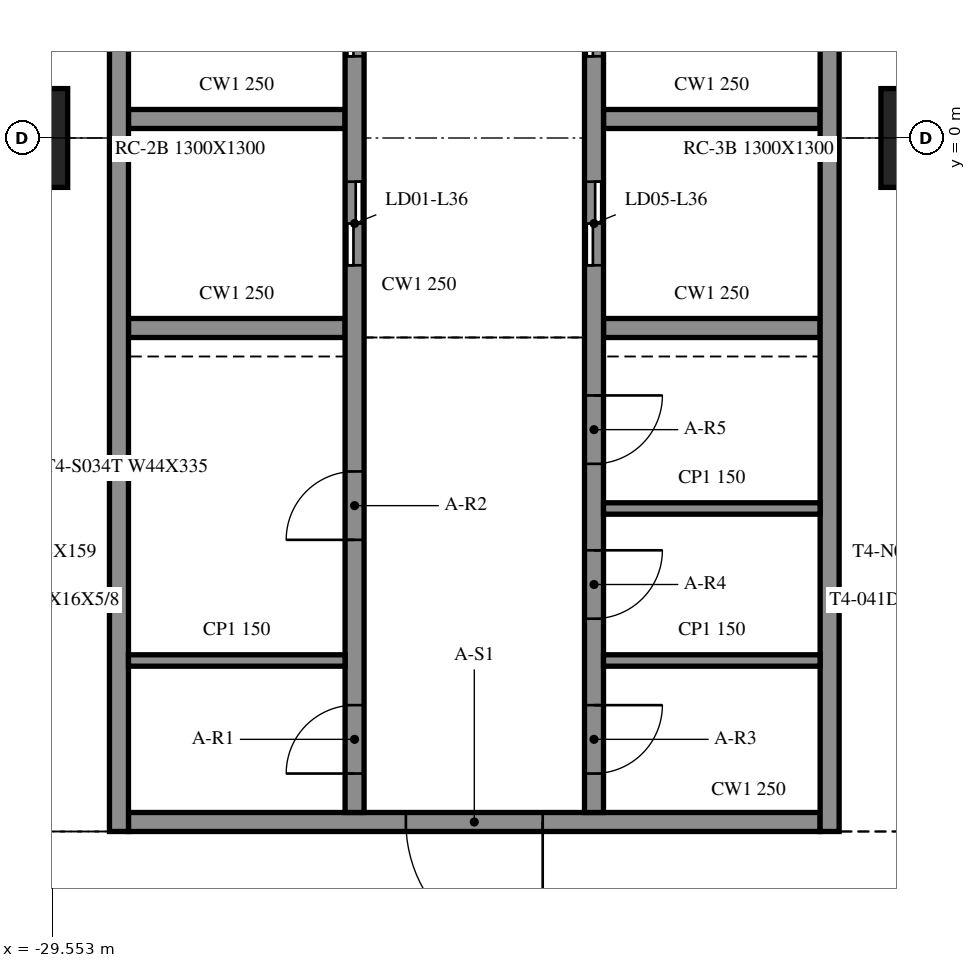
"""IFC4 building model, lengths in metres.
Left out: names, types, materials, properties, quantities, classifications, styles, units other than length and angle.
Written with IfcOpenShell. Run it as: python <this file> out.ifc"""

import sys

from ifc_helpers import new_model, si_unit, direction, frame, frame_2d, origin, origin_2d, place, context, subcontext, project, spatial, rectangle, extrude, element, fill, save


model = new_model("IFC4")
c1 = context("Model", 3, precision=1e-05, world=origin(), true_north=direction((0.0, 1.0)))
c2 = subcontext(c1, "Body", "Model", "MODEL_VIEW")
j1 = project(units=[si_unit("LENGTHUNIT", "METRE"), si_unit("PLANEANGLEUNIT", "RADIAN")], contexts=[c1])
p1 = place(None, origin())
s1 = spatial("IfcSite", under=j1, at=p1, CompositionType="ELEMENT")
p2 = place(p1, origin())
s2 = spatial("IfcBuilding", under=s1, at=p2, CompositionType="ELEMENT")
p3 = place(p2, frame((0.0, 0.0, 154.8)))
s3 = spatial("IfcBuildingStorey", under=s2, at=p3, CompositionType="ELEMENT", Elevation=154.8)
for number, where, z_axis, x_axis in (
    (1, (-30.0, 0.0, -0.55), (0.0, 0.0, 1.0), (1.0, 0.0, 0.0)),
    (2, (-18.0, 0.0, -0.55), (0.0, 0.0, 1.0), (1.0, 0.0, 0.0)),
):
    element("IfcColumn", number, at=place(p3, frame(where, z_axis=z_axis, x_axis=x_axis)), inside=s3, PredefinedType="COLUMN", context=c2, shape_type="SweptSolid", body=[
        extrude(rectangle(XDim=1.3, YDim=1.3, at=origin_2d()), origin(), (0.0, 0.0, 1.0), 4.61),
    ])
for number, where, z_axis, x_axis in (
    (3, (-28.675, 15.125, 0.0), (0.0, 0.0, 1.0), (0.0, -1.0, 0.0)),
    (4, (-19.325, -9.125, 0.0), (0.0, 0.0, 1.0), (0.0, 1.0, 0.0)),
):
    element("IfcWall", number, at=place(p3, frame(where, z_axis=z_axis, x_axis=x_axis)), inside=s3, PredefinedType="SOLIDWALL", context=c2, shape_type="SweptSolid", body=[
        extrude(rectangle(XDim=24.25, YDim=0.25, at=frame_2d((12.125, 0.0))), origin(), (0.0, 0.0, 1.0), 4.06),
    ])
p4 = place(p3, frame((-19.45, -9.0, 0.0), z_axis=(0.0, 0.0, 1.0), x_axis=(-1.0, 0.0, 0.0)))
e5 = element("IfcWall", 5, at=p4, inside=s3, PredefinedType="SOLIDWALL", context=c2, shape_type="SweptSolid", body=[
    extrude(rectangle(XDim=9.1, YDim=0.25, at=frame_2d((4.55, 0.0))), origin(), (0.0, 0.0, 1.0), 4.06),
])
p5 = place(p4, frame((3.65, 0.0, 0.0)))
e6 = element("IfcOpeningElement", 6, at=p5, cuts=e5, PredefinedType="OPENING", context=c2, shape_type="SweptSolid", body=[
    extrude(rectangle(XDim=1.8, YDim=2.1, at=frame_2d((0.9, 1.05))), frame((0.0, 0.135, 0.0), z_axis=(0.0, -1.0, 0.0), x_axis=(1.0, 0.0, 0.0)), (0.0, 0.0, 1.0), 0.27),
])
p6 = place(p3, frame((-25.575, -8.875, 0.0), z_axis=(0.0, 0.0, 1.0), x_axis=(0.0, 1.0, 0.0)))
e7 = element("IfcWall", 7, at=p6, inside=s3, PredefinedType="SOLIDWALL", context=c2, shape_type="SweptSolid", body=[
    extrude(rectangle(XDim=17.5, YDim=0.25, at=frame_2d((8.75, 0.0))), origin(), (0.0, 0.0, 1.0), 4.06),
])
p7 = place(p6, frame((7.2, 0.0, 0.0)))
e8 = element("IfcOpeningElement", 8, at=p7, cuts=e7, PredefinedType="OPENING", context=c2, shape_type="SweptSolid", body=[
    extrude(rectangle(XDim=1.1, YDim=2.1, at=frame_2d((0.55, 1.05))), frame((0.0, 0.135, 0.0), z_axis=(0.0, -1.0, 0.0), x_axis=(1.0, 0.0, 0.0)), (0.0, 0.0, 1.0), 0.27),
])
p8 = place(p6, frame((9.95, 0.0, 0.0)))
e9 = element("IfcOpeningElement", 9, at=p8, cuts=e7, PredefinedType="OPENING", context=c2, shape_type="SweptSolid", body=[
    extrude(rectangle(XDim=1.1, YDim=2.1, at=frame_2d((0.55, 1.05))), frame((0.0, 0.135, 0.0), z_axis=(0.0, -1.0, 0.0), x_axis=(1.0, 0.0, 0.0)), (0.0, 0.0, 1.0), 0.27),
])
p9 = place(p6, frame((12.7, 0.0, 0.0)))
e10 = element("IfcOpeningElement", 10, at=p9, cuts=e7, PredefinedType="OPENING", context=c2, shape_type="SweptSolid", body=[
    extrude(rectangle(XDim=1.1, YDim=2.1, at=frame_2d((0.55, 1.05))), frame((0.0, 0.135, 0.0), z_axis=(0.0, -1.0, 0.0), x_axis=(1.0, 0.0, 0.0)), (0.0, 0.0, 1.0), 0.27),
])
p10 = place(p6, frame((15.45, 0.0, 0.0)))
e11 = element("IfcOpeningElement", 11, at=p10, cuts=e7, PredefinedType="OPENING", context=c2, shape_type="SweptSolid", body=[
    extrude(rectangle(XDim=1.1, YDim=2.1, at=frame_2d((0.55, 1.05))), frame((0.0, 0.135, 0.0), z_axis=(0.0, -1.0, 0.0), x_axis=(1.0, 0.0, 0.0)), (0.0, 0.0, 1.0), 0.27),
])
p11 = place(p6, frame((0.512, 0.0, 0.0)))
e12 = element("IfcOpeningElement", 12, at=p11, cuts=e7, PredefinedType="OPENING", context=c2, shape_type="SweptSolid", body=[
    extrude(rectangle(XDim=0.9, YDim=2.1, at=frame_2d((0.45, 1.05))), frame((0.0, 0.135, 0.0), z_axis=(0.0, -1.0, 0.0), x_axis=(1.0, 0.0, 0.0)), (0.0, 0.0, 1.0), 0.27),
])
p12 = place(p6, frame((3.587, 0.0, 0.0)))
e13 = element("IfcOpeningElement", 13, at=p12, cuts=e7, PredefinedType="OPENING", context=c2, shape_type="SweptSolid", body=[
    extrude(rectangle(XDim=0.9, YDim=2.1, at=frame_2d((0.45, 1.05))), frame((0.0, 0.135, 0.0), z_axis=(0.0, -1.0, 0.0), x_axis=(1.0, 0.0, 0.0)), (0.0, 0.0, 1.0), 0.27),
])
p13 = place(p3, frame((-22.425, 14.875, 0.0), z_axis=(0.0, 0.0, 1.0), x_axis=(0.0, -1.0, 0.0)))
e14 = element("IfcWall", 14, at=p13, inside=s3, PredefinedType="SOLIDWALL", context=c2, shape_type="SweptSolid", body=[
    extrude(rectangle(XDim=23.75, YDim=0.25, at=frame_2d((11.875, 0.0))), origin(), (0.0, 0.0, 1.0), 4.06),
])
p14 = place(p13, frame((15.45, 0.0, 0.0)))
e15 = element("IfcOpeningElement", 15, at=p14, cuts=e14, PredefinedType="OPENING", context=c2, shape_type="SweptSolid", body=[
    extrude(rectangle(XDim=1.1, YDim=2.1, at=frame_2d((0.55, 1.05))), frame((0.0, 0.135, 0.0), z_axis=(0.0, -1.0, 0.0), x_axis=(1.0, 0.0, 0.0)), (0.0, 0.0, 1.0), 0.27),
])
p15 = place(p13, frame((12.7, 0.0, 0.0)))
e16 = element("IfcOpeningElement", 16, at=p15, cuts=e14, PredefinedType="OPENING", context=c2, shape_type="SweptSolid", body=[
    extrude(rectangle(XDim=1.1, YDim=2.1, at=frame_2d((0.55, 1.05))), frame((0.0, 0.135, 0.0), z_axis=(0.0, -1.0, 0.0), x_axis=(1.0, 0.0, 0.0)), (0.0, 0.0, 1.0), 0.27),
])
p16 = place(p13, frame((9.95, 0.0, 0.0)))
e17 = element("IfcOpeningElement", 17, at=p16, cuts=e14, PredefinedType="OPENING", context=c2, shape_type="SweptSolid", body=[
    extrude(rectangle(XDim=1.1, YDim=2.1, at=frame_2d((0.55, 1.05))), frame((0.0, 0.135, 0.0), z_axis=(0.0, -1.0, 0.0), x_axis=(1.0, 0.0, 0.0)), (0.0, 0.0, 1.0), 0.27),
])
p17 = place(p13, frame((7.2, 0.0, 0.0)))
e18 = element("IfcOpeningElement", 18, at=p17, cuts=e14, PredefinedType="OPENING", context=c2, shape_type="SweptSolid", body=[
    extrude(rectangle(XDim=1.1, YDim=2.1, at=frame_2d((0.55, 1.05))), frame((0.0, 0.135, 0.0), z_axis=(0.0, -1.0, 0.0), x_axis=(1.0, 0.0, 0.0)), (0.0, 0.0, 1.0), 0.27),
])
p18 = place(p13, frame((22.337, 0.0, 0.0)))
e19 = element("IfcOpeningElement", 19, at=p18, cuts=e14, PredefinedType="OPENING", context=c2, shape_type="SweptSolid", body=[
    extrude(rectangle(XDim=0.9, YDim=2.1, at=frame_2d((0.45, 1.05))), frame((0.0, 0.135, 0.0), z_axis=(0.0, -1.0, 0.0), x_axis=(1.0, 0.0, 0.0)), (0.0, 0.0, 1.0), 0.27),
])
p19 = place(p13, frame((20.3, 0.0, 0.0)))
e20 = element("IfcOpeningElement", 20, at=p19, cuts=e14, PredefinedType="OPENING", context=c2, shape_type="SweptSolid", body=[
    extrude(rectangle(XDim=0.9, YDim=2.1, at=frame_2d((0.45, 1.05))), frame((0.0, 0.135, 0.0), z_axis=(0.0, -1.0, 0.0), x_axis=(1.0, 0.0, 0.0)), (0.0, 0.0, 1.0), 0.27),
])
p20 = place(p13, frame((18.262, 0.0, 0.0)))
e21 = element("IfcOpeningElement", 21, at=p20, cuts=e14, PredefinedType="OPENING", context=c2, shape_type="SweptSolid", body=[
    extrude(rectangle(XDim=0.9, YDim=2.1, at=frame_2d((0.45, 1.05))), frame((0.0, 0.135, 0.0), z_axis=(0.0, -1.0, 0.0), x_axis=(1.0, 0.0, 0.0)), (0.0, 0.0, 1.0), 0.27),
])
p21 = place(p13, frame((3.587, 0.0, 0.0)))
e22 = element("IfcOpeningElement", 22, at=p21, cuts=e14, PredefinedType="OPENING", context=c2, shape_type="SweptSolid", body=[
    extrude(rectangle(XDim=0.9, YDim=2.1, at=frame_2d((0.45, 1.05))), frame((0.0, 0.135, 0.0), z_axis=(0.0, -1.0, 0.0), x_axis=(1.0, 0.0, 0.0)), (0.0, 0.0, 1.0), 0.27),
])
p22 = place(p13, frame((0.512, 0.0, 0.0)))
e23 = element("IfcOpeningElement", 23, at=p22, cuts=e14, PredefinedType="OPENING", context=c2, shape_type="SweptSolid", body=[
    extrude(rectangle(XDim=0.9, YDim=2.1, at=frame_2d((0.45, 1.05))), frame((0.0, 0.135, 0.0), z_axis=(0.0, -1.0, 0.0), x_axis=(1.0, 0.0, 0.0)), (0.0, 0.0, 1.0), 0.27),
])
for number, where, z_axis, x_axis in (
    (24, (-28.55, -2.5, 0.0), (0.0, 0.0, 1.0), (1.0, 0.0, 0.0)),
    (25, (-28.55, 0.25, 0.0), (0.0, 0.0, 1.0), (1.0, 0.0, 0.0)),
    (26, (-22.3, -2.5, 0.0), (0.0, 0.0, 1.0), (1.0, 0.0, 0.0)),
    (27, (-22.3, 0.25, 0.0), (0.0, 0.0, 1.0), (1.0, 0.0, 0.0)),
):
    element("IfcWall", number, at=place(p3, frame(where, z_axis=z_axis, x_axis=x_axis)), inside=s3, PredefinedType="SOLIDWALL", context=c2, shape_type="SweptSolid", body=[
        extrude(rectangle(XDim=2.85, YDim=0.25, at=frame_2d((1.425, 0.0))), origin(), (0.0, 0.0, 1.0), 4.06),
    ])
for number, where, z_axis, x_axis in (
    (28, (-28.55, -6.875, 0.0), (0.0, 0.0, 1.0), (1.0, 0.0, 0.0)),
    (29, (-22.3, -6.875, 0.0), (0.0, 0.0, 1.0), (1.0, 0.0, 0.0)),
    (30, (-22.3, -4.875, 0.0), (0.0, 0.0, 1.0), (1.0, 0.0, 0.0)),
):
    element("IfcWall", number, at=place(p3, frame(where, z_axis=z_axis, x_axis=x_axis)), inside=s3, PredefinedType="PARTITIONING", context=c2, shape_type="SweptSolid", body=[
        extrude(rectangle(XDim=2.85, YDim=0.15, at=frame_2d((1.425, 0.0))), origin(), (0.0, 0.0, 1.0), 4.06),
    ])
p23 = place(p5, origin())
e31 = element("IfcDoor", 31, at=p23, inside=s3, OperationType="DOUBLE_DOOR_SINGLE_SWING", PredefinedType="DOOR", context=c2, shape_type="SweptSolid", body=[
    extrude(rectangle(XDim=1.8, YDim=2.1, at=frame_2d((0.9, 1.05))), frame((0.0, 0.025, 0.0), z_axis=(0.0, -1.0, 0.0), x_axis=(1.0, 0.0, 0.0)), (0.0, 0.0, 1.0), 0.05),
])
fill(e6, e31)
p24 = place(p14, origin())
e32 = element("IfcDoor", 32, at=p24, inside=s3, OperationType="DOUBLE_DOOR_SLIDING", PredefinedType="DOOR", context=c2, shape_type="SweptSolid", body=[
    extrude(rectangle(XDim=1.1, YDim=2.1, at=frame_2d((0.55, 1.05))), frame((0.0, 0.025, 0.0), z_axis=(0.0, -1.0, 0.0), x_axis=(1.0, 0.0, 0.0)), (0.0, 0.0, 1.0), 0.05),
])
fill(e15, e32)
p25 = place(p15, origin())
e33 = element("IfcDoor", 33, at=p25, inside=s3, OperationType="DOUBLE_DOOR_SLIDING", PredefinedType="DOOR", context=c2, shape_type="SweptSolid", body=[
    extrude(rectangle(XDim=1.1, YDim=2.1, at=frame_2d((0.55, 1.05))), frame((0.0, 0.025, 0.0), z_axis=(0.0, -1.0, 0.0), x_axis=(1.0, 0.0, 0.0)), (0.0, 0.0, 1.0), 0.05),
])
fill(e16, e33)
p26 = place(p7, origin())
e34 = element("IfcDoor", 34, at=p26, inside=s3, OperationType="DOUBLE_DOOR_SLIDING", PredefinedType="DOOR", context=c2, shape_type="SweptSolid", body=[
    extrude(rectangle(XDim=1.1, YDim=2.1, at=frame_2d((0.55, 1.05))), frame((0.0, 0.025, 0.0), z_axis=(0.0, -1.0, 0.0), x_axis=(1.0, 0.0, 0.0)), (0.0, 0.0, 1.0), 0.05),
])
fill(e8, e34)
p27 = place(p8, origin())
e35 = element("IfcDoor", 35, at=p27, inside=s3, OperationType="DOUBLE_DOOR_SLIDING", PredefinedType="DOOR", context=c2, shape_type="SweptSolid", body=[
    extrude(rectangle(XDim=1.1, YDim=2.1, at=frame_2d((0.55, 1.05))), frame((0.0, 0.025, 0.0), z_axis=(0.0, -1.0, 0.0), x_axis=(1.0, 0.0, 0.0)), (0.0, 0.0, 1.0), 0.05),
])
fill(e9, e35)
p28 = place(p11, origin())
e36 = element("IfcDoor", 36, at=p28, inside=s3, OperationType="SINGLE_SWING_LEFT", PredefinedType="DOOR", context=c2, shape_type="SweptSolid", body=[
    extrude(rectangle(XDim=0.9, YDim=2.1, at=frame_2d((0.45, 1.05))), frame((0.0, 0.025, 0.0), z_axis=(0.0, -1.0, 0.0), x_axis=(1.0, 0.0, 0.0)), (0.0, 0.0, 1.0), 0.05),
])
fill(e12, e36)
p29 = place(p12, origin())
e37 = element("IfcDoor", 37, at=p29, inside=s3, OperationType="SINGLE_SWING_RIGHT", PredefinedType="DOOR", context=c2, shape_type="SweptSolid", body=[
    extrude(rectangle(XDim=0.9, YDim=2.1, at=frame_2d((0.45, 1.05))), frame((0.0, 0.025, 0.0), z_axis=(0.0, -1.0, 0.0), x_axis=(1.0, 0.0, 0.0)), (0.0, 0.0, 1.0), 0.05),
])
fill(e13, e37)
p30 = place(p18, origin())
e38 = element("IfcDoor", 38, at=p30, inside=s3, OperationType="SINGLE_SWING_LEFT", PredefinedType="DOOR", context=c2, shape_type="SweptSolid", body=[
    extrude(rectangle(XDim=0.9, YDim=2.1, at=frame_2d((0.45, 1.05))), frame((0.0, 0.025, 0.0), z_axis=(0.0, -1.0, 0.0), x_axis=(1.0, 0.0, 0.0)), (0.0, 0.0, 1.0), 0.05),
])
fill(e19, e38)
p31 = place(p19, origin())
e39 = element("IfcDoor", 39, at=p31, inside=s3, OperationType="SINGLE_SWING_RIGHT", PredefinedType="DOOR", context=c2, shape_type="SweptSolid", body=[
    extrude(rectangle(XDim=0.9, YDim=2.1, at=frame_2d((0.45, 1.05))), frame((0.0, 0.025, 0.0), z_axis=(0.0, -1.0, 0.0), x_axis=(1.0, 0.0, 0.0)), (0.0, 0.0, 1.0), 0.05),
])
fill(e20, e39)
p32 = place(p20, origin())
e40 = element("IfcDoor", 40, at=p32, inside=s3, OperationType="SINGLE_SWING_LEFT", PredefinedType="DOOR", context=c2, shape_type="SweptSolid", body=[
    extrude(rectangle(XDim=0.9, YDim=2.1, at=frame_2d((0.45, 1.05))), frame((0.0, 0.025, 0.0), z_axis=(0.0, -1.0, 0.0), x_axis=(1.0, 0.0, 0.0)), (0.0, 0.0, 1.0), 0.05),
])
fill(e21, e40)
save(model, sys.argv[1])
